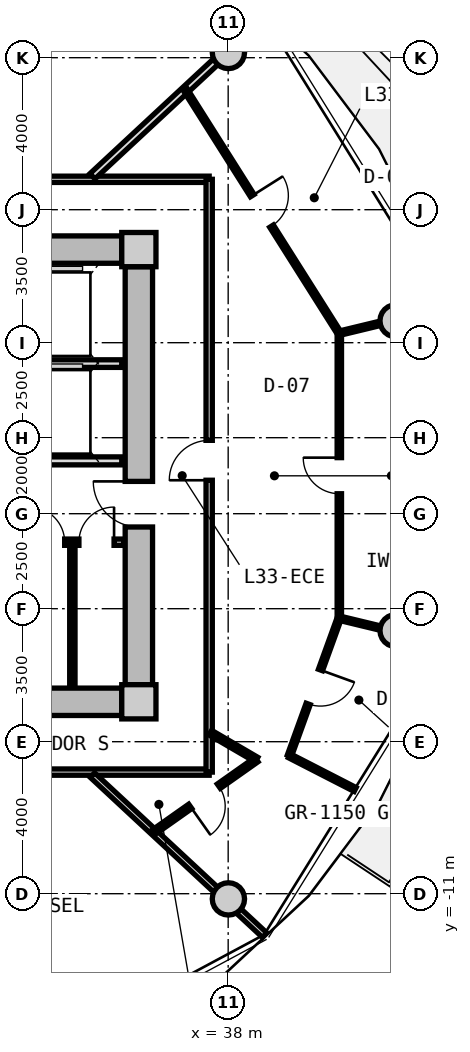
"""IFC4 building model, lengths in metres.
Left out: names, types, materials, properties, quantities, classifications, styles, units other than length and angle.
Written with IfcOpenShell. Run it as: python <this file> out.ifc"""

import sys

from ifc_helpers import new_model, si_unit, direction, frame, frame_2d, origin, origin_2d, place, context, subcontext, project, spatial, rectangle, circle, extrude, source, transform, mapped, element, fill, save


model = new_model("IFC4")
c1 = context("Model", 3, precision=1e-05, world=origin(), true_north=direction((0.0, 1.0)))
c2 = subcontext(c1, "Body", "Model", "MODEL_VIEW")
j1 = project(units=[si_unit("LENGTHUNIT", "METRE"), si_unit("PLANEANGLEUNIT", "RADIAN")], contexts=[c1])
p1 = place(None, origin())
s1 = spatial("IfcSite", under=j1, at=p1, CompositionType="ELEMENT")
p2 = place(p1, origin())
s2 = spatial("IfcBuilding", under=s1, at=p2, CompositionType="ELEMENT")
p3 = place(p2, frame((0.0, 0.0, 108.45)))
s3 = spatial("IfcBuildingStorey", under=s2, at=p3, CompositionType="ELEMENT", Elevation=108.45)
m1 = source(origin(), c2, "Body", "SweptSolid", [
    extrude(rectangle(XDim=0.9, YDim=0.9, at=origin_2d()), origin(), (0.0, 0.0, 1.0), 3.05),
])
for number, where, z_axis, x_axis in (
    (1, (35.65, -5.95, 0.0), (0.0, 0.0, 1.0), (1.0, 0.0, 0.0)),
    (2, (35.65, 5.95, 0.0), (0.0, 0.0, 1.0), (1.0, 0.0, 0.0)),
):
    element("IfcColumn", number, at=place(p3, frame(where, z_axis=z_axis, x_axis=x_axis)), inside=s3, PredefinedType="COLUMN", context=c2, shape_type="MappedRepresentation", body=[
        mapped(m1, transform((0.0, 0.0, 0.0), x_axis=(1.0, 0.0, 0.0), y_axis=(0.0, 1.0, 0.0), z_axis=(0.0, 0.0, 1.0), scale=1.0)),
    ])
m2 = source(origin(), c2, "Body", "SweptSolid", [
    extrude(rectangle(XDim=14.4, YDim=0.72, at=frame_2d((7.2, 0.0))), origin(), (0.0, 0.0, 1.0), 2.79),
])
for number, where, z_axis, x_axis in (
    (3, (20.8, 5.95, 0.0), (0.0, 0.0, 1.0), (1.0, 0.0, 0.0)),
    (4, (35.2, -5.95, 0.0), (0.0, 0.0, 1.0), (-1.0, 0.0, 0.0)),
):
    element("IfcWall", number, at=place(p3, frame(where, z_axis=z_axis, x_axis=x_axis)), inside=s3, PredefinedType="SHEAR", context=c2, shape_type="MappedRepresentation", body=[
        mapped(m2, transform((0.0, 0.0, 0.0), x_axis=(1.0, 0.0, 0.0), y_axis=(0.0, 1.0, 0.0), z_axis=(0.0, 0.0, 1.0), scale=1.0)),
    ])
m3 = source(origin(), c2, "Body", "SweptSolid", [
    extrude(rectangle(XDim=11.0, YDim=0.72, at=frame_2d((5.5, 0.0))), origin(), (0.0, 0.0, 1.0), 2.79),
])
p4 = place(p3, frame((35.65, 5.5, 0.0), z_axis=(0.0, 0.0, 1.0), x_axis=(0.0, -1.0, 0.0)))
e5 = element("IfcWall", 5, at=p4, inside=s3, PredefinedType="SHEAR", context=c2, shape_type="MappedRepresentation", body=[
    mapped(m3, transform((0.0, 0.0, 0.0), x_axis=(1.0, 0.0, 0.0), y_axis=(0.0, 1.0, 0.0), z_axis=(0.0, 0.0, 1.0), scale=1.0)),
])
p5 = place(p4, frame((5.65, 0.0, 0.0)))
e6 = element("IfcOpeningElement", 6, at=p5, cuts=e5, PredefinedType="OPENING", context=c2, shape_type="SweptSolid", body=[
    extrude(rectangle(XDim=1.2, YDim=2.15, at=frame_2d((0.6, 1.075))), frame((0.0, 0.37, 0.0), z_axis=(0.0, -1.0, 0.0), x_axis=(1.0, 0.0, 0.0)), (0.0, 0.0, 1.0), 0.74),
])
m4 = source(origin(), c2, "Body", "SweptSolid", [
    extrude(circle(Radius=0.425, at=origin_2d()), origin(), (0.0, 0.0, 1.0), 3.05),
])
for number, where, z_axis, x_axis in (
    (7, (42.419, 4.076, 0.0), (0.0, 0.0, 1.0), (1.0, 0.0, 0.0)),
    (8, (38.006, 11.137, 0.0), (0.0, 0.0, 1.0), (1.0, 0.0, 0.0)),
    (9, (38.006, -11.137, 0.0), (0.0, 0.0, 1.0), (1.0, 0.0, 0.0)),
    (10, (42.419, -4.076, 0.0), (0.0, 0.0, 1.0), (1.0, 0.0, 0.0)),
):
    element("IfcColumn", number, at=place(p3, frame(where, z_axis=z_axis, x_axis=x_axis)), inside=s3, PredefinedType="COLUMN", context=c2, shape_type="MappedRepresentation", body=[
        mapped(m4, transform((0.0, 0.0, 0.0), x_axis=(1.0, 0.0, 0.0), y_axis=(0.0, 1.0, 0.0), z_axis=(0.0, 0.0, 1.0), scale=1.0)),
    ])
m5 = source(origin(), c2, "Body", "SweptSolid", [
    extrude(rectangle(XDim=3.2, YDim=0.2, at=frame_2d((1.6, 0.0))), origin(), (0.0, 0.0, 1.0), 2.775),
])
p6 = place(p3, frame((32.0, 2.95, 0.0), z_axis=(0.0, 0.0, 1.0), x_axis=(1.0, 0.0, 0.0)))
e11 = element("IfcWall", 11, at=p6, inside=s3, PredefinedType="PARTITIONING", context=c2, shape_type="MappedRepresentation", body=[
    mapped(m5, transform((0.0, 0.0, 0.0), x_axis=(1.0, 0.0, 0.0), y_axis=(0.0, 1.0, 0.0), z_axis=(0.0, 0.0, 1.0), scale=1.0)),
])
m6 = source(origin(), c2, "Body", "SweptSolid", [
    extrude(rectangle(XDim=6.66, YDim=0.21, at=frame_2d((3.33, 0.0))), origin(), (0.0, 0.0, 1.0), 2.775),
])
p7 = place(p3, frame((28.54, 0.39, 0.0), z_axis=(0.0, 0.0, 1.0), x_axis=(1.0, 0.0, 0.0)))
e12 = element("IfcWall", 12, at=p7, inside=s3, PredefinedType="PARTITIONING", context=c2, shape_type="MappedRepresentation", body=[
    mapped(m6, transform((0.0, 0.0, 0.0), x_axis=(1.0, 0.0, 0.0), y_axis=(0.0, 1.0, 0.0), z_axis=(0.0, 0.0, 1.0), scale=1.0)),
])
p8 = place(p7, frame((1.0, 0.0, 0.0)))
e13 = element("IfcOpeningElement", 13, at=p8, cuts=e12, PredefinedType="OPENING", context=c2, shape_type="SweptSolid", body=[
    extrude(rectangle(XDim=1.2, YDim=2.15, at=frame_2d((0.6, 1.075))), frame((0.0, 0.115, 0.0), z_axis=(0.0, -1.0, 0.0), x_axis=(1.0, 0.0, 0.0)), (0.0, 0.0, 1.0), 0.23),
])
m7 = source(origin(), c2, "Body", "SweptSolid", [
    extrude(rectangle(XDim=2.7, YDim=0.165, at=frame_2d((1.35, 0.0))), origin(), (0.0, 0.0, 1.0), 2.775),
])
p9 = place(p3, frame((32.55, -1.75, 0.0), z_axis=(0.0, 0.0, 1.0), x_axis=(1.0, 0.0, 0.0)))
e14 = element("IfcWall", 14, at=p9, inside=s3, PredefinedType="PARTITIONING", context=c2, shape_type="MappedRepresentation", body=[
    mapped(m7, transform((0.0, 0.0, 0.0), x_axis=(1.0, 0.0, 0.0), y_axis=(0.0, 1.0, 0.0), z_axis=(0.0, 0.0, 1.0), scale=1.0)),
])
p10 = place(p9, frame((0.222, 0.0, 0.0)))
e15 = element("IfcOpeningElement", 15, at=p10, cuts=e14, PredefinedType="OPENING", context=c2, shape_type="SweptSolid", body=[
    extrude(rectangle(XDim=0.925, YDim=2.1, at=frame_2d((0.462, 1.05))), frame((0.0, 0.093, 0.0), z_axis=(0.0, -1.0, 0.0), x_axis=(1.0, 0.0, 0.0)), (0.0, 0.0, 1.0), 0.185),
])
p11 = place(p9, frame((1.522, 0.0, 0.0)))
e16 = element("IfcOpeningElement", 16, at=p11, cuts=e14, PredefinedType="OPENING", context=c2, shape_type="SweptSolid", body=[
    extrude(rectangle(XDim=0.925, YDim=2.1, at=frame_2d((0.462, 1.05))), frame((0.0, 0.093, 0.0), z_axis=(0.0, -1.0, 0.0), x_axis=(1.0, 0.0, 0.0)), (0.0, 0.0, 1.0), 0.185),
])
m8 = source(origin(), c2, "Body", "SweptSolid", [
    extrude(rectangle(XDim=3.8, YDim=0.14, at=frame_2d((1.9, 0.0))), origin(), (0.0, 0.0, 1.0), 2.775),
])
p12 = place(p3, frame((33.9, -5.55, 0.0), z_axis=(0.0, 0.0, 1.0), x_axis=(0.0, 1.0, 0.0)))
e17 = element("IfcWall", 17, at=p12, inside=s3, PredefinedType="PARTITIONING", context=c2, shape_type="MappedRepresentation", body=[
    mapped(m8, transform((0.0, 0.0, 0.0), x_axis=(1.0, 0.0, 0.0), y_axis=(0.0, 1.0, 0.0), z_axis=(0.0, 0.0, 1.0), scale=1.0)),
])
m9 = source(origin(), c2, "Body", "SweptSolid", [
    extrude(rectangle(XDim=9.234, YDim=0.165, at=frame_2d((4.617, 0.0))), origin(), (0.0, 0.0, 1.0), 2.775),
])
p13 = place(p3, frame((28.266, 7.8, 0.0), z_axis=(0.0, 0.0, 1.0), x_axis=(1.0, 0.0, 0.0)))
e18 = element("IfcWall", 18, at=p13, inside=s3, PredefinedType="PARTITIONING", context=c2, shape_type="MappedRepresentation", body=[
    mapped(m9, transform((0.0, 0.0, 0.0), x_axis=(1.0, 0.0, 0.0), y_axis=(0.0, 1.0, 0.0), z_axis=(0.0, 0.0, 1.0), scale=1.0)),
])
p14 = place(p13, frame((2.588, 0.0, 0.0)))
e19 = element("IfcOpeningElement", 19, at=p14, cuts=e18, PredefinedType="OPENING", context=c2, shape_type="SweptSolid", body=[
    extrude(rectangle(XDim=1.25, YDim=2.2, at=frame_2d((0.625, 1.1))), frame((0.0, 0.093, 0.0), z_axis=(0.0, -1.0, 0.0), x_axis=(1.0, 0.0, 0.0)), (0.0, 0.0, 1.0), 0.185),
])
m10 = source(origin(), c2, "Body", "SweptSolid", [
    extrude(rectangle(XDim=8.6, YDim=0.165, at=frame_2d((4.3, 0.0))), origin(), (0.0, 0.0, 1.0), 2.775),
])
p15 = place(p3, frame((37.5, -7.8, 0.0), z_axis=(0.0, 0.0, 1.0), x_axis=(-1.0, 0.0, 0.0)))
e20 = element("IfcWall", 20, at=p15, inside=s3, PredefinedType="PARTITIONING", context=c2, shape_type="MappedRepresentation", body=[
    mapped(m10, transform((0.0, 0.0, 0.0), x_axis=(1.0, 0.0, 0.0), y_axis=(0.0, 1.0, 0.0), z_axis=(0.0, 0.0, 1.0), scale=1.0)),
])
m11 = source(origin(), c2, "Body", "SweptSolid", [
    extrude(rectangle(XDim=15.6, YDim=0.165, at=frame_2d((7.8, 0.0))), origin(), (0.0, 0.0, 1.0), 2.775),
])
p16 = place(p3, frame((37.5, 7.8, 0.0), z_axis=(0.0, 0.0, 1.0), x_axis=(0.0, -1.0, 0.0)))
e21 = element("IfcWall", 21, at=p16, inside=s3, PredefinedType="PARTITIONING", context=c2, shape_type="MappedRepresentation", body=[
    mapped(m11, transform((0.0, 0.0, 0.0), x_axis=(1.0, 0.0, 0.0), y_axis=(0.0, 1.0, 0.0), z_axis=(0.0, 0.0, 1.0), scale=1.0)),
])
p17 = place(p16, frame((6.87, 0.0, 0.0)))
e22 = element("IfcOpeningElement", 22, at=p17, cuts=e21, PredefinedType="OPENING", context=c2, shape_type="SweptSolid", body=[
    extrude(rectangle(XDim=1.05, YDim=2.15, at=frame_2d((0.525, 1.075))), frame((0.0, 0.093, 0.0), z_axis=(0.0, -1.0, 0.0), x_axis=(1.0, 0.0, 0.0)), (0.0, 0.0, 1.0), 0.185),
])
m12 = source(origin(), c2, "Body", "SweptSolid", [
    extrude(rectangle(XDim=6.187, YDim=0.165, at=frame_2d((3.093, 0.0))), origin(), (0.0, 0.0, 1.0), 2.275),
])
p18 = place(p3, frame((34.429, -7.88, 0.0), z_axis=(0.0, 0.0, 1.0), x_axis=(0.732501077882, -0.680765870841, 0.0)))
e23 = element("IfcWall", 23, at=p18, inside=s3, PredefinedType="PARTITIONING", context=c2, shape_type="MappedRepresentation", body=[
    mapped(m12, transform((0.0, 0.0, 0.0), x_axis=(1.0, 0.0, 0.0), y_axis=(0.0, 1.0, 0.0), z_axis=(0.0, 0.0, 1.0), scale=1.0)),
])
m13 = source(origin(), c2, "Body", "SweptSolid", [
    extrude(rectangle(XDim=6.187, YDim=0.19, at=frame_2d((3.093, 0.0))), origin(), (0.0, 0.0, 1.0), 2.275),
])
p19 = place(p3, frame((34.429, 7.88, 0.0), z_axis=(0.0, 0.0, 1.0), x_axis=(0.732501077882, 0.680765870841, 0.0)))
e24 = element("IfcWall", 24, at=p19, inside=s3, PredefinedType="PARTITIONING", context=c2, shape_type="MappedRepresentation", body=[
    mapped(m13, transform((0.0, 0.0, 0.0), x_axis=(1.0, 0.0, 0.0), y_axis=(0.0, 1.0, 0.0), z_axis=(0.0, 0.0, 1.0), scale=1.0)),
])
m14 = source(origin(), c2, "Body", "SweptSolid", [
    extrude(rectangle(XDim=7.499, YDim=0.115, at=frame_2d((3.75, 0.0))), origin(), (0.0, 0.0, 1.0), 2.775),
])
p20 = place(p3, frame((40.925, -3.75, 0.0), z_axis=(0.0, 0.0, 1.0), x_axis=(0.0, 1.0, 0.0)))
e25 = element("IfcWall", 25, at=p20, inside=s3, PredefinedType="PARTITIONING", context=c2, shape_type="MappedRepresentation", body=[
    mapped(m14, transform((0.0, 0.0, 0.0), x_axis=(1.0, 0.0, 0.0), y_axis=(0.0, 1.0, 0.0), z_axis=(0.0, 0.0, 1.0), scale=1.0)),
])
p21 = place(p20, frame((3.275, 0.0, 0.0)))
e26 = element("IfcOpeningElement", 26, at=p21, cuts=e25, PredefinedType="OPENING", context=c2, shape_type="SweptSolid", body=[
    extrude(rectangle(XDim=0.95, YDim=2.1, at=frame_2d((0.475, 1.05))), frame((0.0, 0.067, 0.0), z_axis=(0.0, -1.0, 0.0), x_axis=(1.0, 0.0, 0.0)), (0.0, 0.0, 1.0), 0.135),
])
m15 = source(origin(), c2, "Body", "SweptSolid", [
    extrude(rectangle(XDim=2.879, YDim=0.115, at=frame_2d((1.439, 0.0))), origin(), (0.0, 0.0, 1.0), 2.275),
])
p22 = place(p3, frame((40.925, -3.75, 0.0), z_axis=(0.0, 0.0, 1.0), x_axis=(0.972018140943, -0.234905797454, 0.0)))
e27 = element("IfcWall", 27, at=p22, inside=s3, PredefinedType="PARTITIONING", context=c2, shape_type="MappedRepresentation", body=[
    mapped(m15, transform((0.0, 0.0, 0.0), x_axis=(1.0, 0.0, 0.0), y_axis=(0.0, 1.0, 0.0), z_axis=(0.0, 0.0, 1.0), scale=1.0)),
])
m16 = source(origin(), c2, "Body", "SweptSolid", [
    extrude(rectangle(XDim=7.618, YDim=0.115, at=frame_2d((3.809, 0.0))), origin(), (0.0, 0.0, 1.0), 2.775),
])
p23 = place(p3, frame((40.923, 3.749, 0.0), z_axis=(0.0, 0.0, 1.0), x_axis=(-0.534316104929, 0.845284744931, 0.0)))
e28 = element("IfcWall", 28, at=p23, inside=s3, PredefinedType="PARTITIONING", context=c2, shape_type="MappedRepresentation", body=[
    mapped(m16, transform((0.0, 0.0, 0.0), x_axis=(1.0, 0.0, 0.0), y_axis=(0.0, 1.0, 0.0), z_axis=(0.0, 0.0, 1.0), scale=1.0)),
])
p24 = place(p23, frame((3.334, 0.0, 0.0)))
e29 = element("IfcOpeningElement", 29, at=p24, cuts=e28, PredefinedType="OPENING", context=c2, shape_type="SweptSolid", body=[
    extrude(rectangle(XDim=0.95, YDim=2.1, at=frame_2d((0.475, 1.05))), frame((0.0, 0.067, 0.0), z_axis=(0.0, -1.0, 0.0), x_axis=(1.0, 0.0, 0.0)), (0.0, 0.0, 1.0), 0.135),
])
m17 = source(origin(), c2, "Body", "SweptSolid", [
    extrude(rectangle(XDim=2.881, YDim=0.115, at=frame_2d((1.44, 0.0))), origin(), (0.0, 0.0, 1.0), 2.275),
])
p25 = place(p3, frame((40.923, 3.749, 0.0), z_axis=(0.0, 0.0, 1.0), x_axis=(0.972031524605, 0.234850410208, 0.0)))
e30 = element("IfcWall", 30, at=p25, inside=s3, PredefinedType="PARTITIONING", context=c2, shape_type="MappedRepresentation", body=[
    mapped(m17, transform((0.0, 0.0, 0.0), x_axis=(1.0, 0.0, 0.0), y_axis=(0.0, 1.0, 0.0), z_axis=(0.0, 0.0, 1.0), scale=1.0)),
])
m18 = source(origin(), c2, "Body", "SweptSolid", [
    extrude(rectangle(XDim=1.407, YDim=0.14, at=frame_2d((0.704, 0.0))), origin(), (0.0, 0.0, 1.0), 2.775),
])
p26 = place(p3, frame((37.53, -6.762, 0.0), z_axis=(0.0, 0.0, 1.0), x_axis=(0.863539718977, -0.504280828258, 0.0)))
e31 = element("IfcWall", 31, at=p26, inside=s3, PredefinedType="PARTITIONING", context=c2, shape_type="MappedRepresentation", body=[
    mapped(m18, transform((0.0, 0.0, 0.0), x_axis=(1.0, 0.0, 0.0), y_axis=(0.0, 1.0, 0.0), z_axis=(0.0, 0.0, 1.0), scale=1.0)),
])
m19 = source(origin(), c2, "Body", "SweptSolid", [
    extrude(rectangle(XDim=3.347, YDim=0.14, at=frame_2d((1.673, 0.0))), origin(), (0.0, 0.0, 1.0), 2.775),
])
p27 = place(p3, frame((38.745, -7.472, 0.0), z_axis=(0.0, 0.0, 1.0), x_axis=(-0.81705680263, -0.576557179537, 0.0)))
e32 = element("IfcWall", 32, at=p27, inside=s3, PredefinedType="PARTITIONING", context=c2, shape_type="MappedRepresentation", body=[
    mapped(m19, transform((0.0, 0.0, 0.0), x_axis=(1.0, 0.0, 0.0), y_axis=(0.0, 1.0, 0.0), z_axis=(0.0, 0.0, 1.0), scale=1.0)),
])
p28 = place(p27, frame((1.214, 0.0, 0.0)))
e33 = element("IfcOpeningElement", 33, at=p28, cuts=e32, PredefinedType="OPENING", context=c2, shape_type="SweptSolid", body=[
    extrude(rectangle(XDim=0.92, YDim=2.1, at=frame_2d((0.46, 1.05))), frame((0.0, 0.08, 0.0), z_axis=(0.0, -1.0, 0.0), x_axis=(1.0, 0.0, 0.0)), (0.0, 0.0, 1.0), 0.16),
])
m20 = source(origin(), c2, "Body", "SweptSolid", [
    extrude(rectangle(XDim=1.945, YDim=0.115, at=frame_2d((0.973, 0.0))), origin(), (0.0, 0.0, 1.0), 2.775),
])
p29 = place(p3, frame((39.611, -7.37, 0.0), z_axis=(0.0, 0.0, 1.0), x_axis=(0.889684148329, -0.456576517368, 0.0)))
e34 = element("IfcWall", 34, at=p29, inside=s3, PredefinedType="PARTITIONING", context=c2, shape_type="MappedRepresentation", body=[
    mapped(m20, transform((0.0, 0.0, 0.0), x_axis=(1.0, 0.0, 0.0), y_axis=(0.0, 1.0, 0.0), z_axis=(0.0, 0.0, 1.0), scale=1.0)),
])
m21 = source(origin(), c2, "Body", "SweptSolid", [
    extrude(rectangle(XDim=3.852, YDim=0.115, at=frame_2d((1.926, 0.0))), origin(), (0.0, 0.0, 1.0), 2.775),
])
p30 = place(p3, frame((39.611, -7.37, 0.0), z_axis=(0.0, 0.0, 1.0), x_axis=(0.340653649518, 0.940188859257, 0.0)))
e35 = element("IfcWall", 35, at=p30, inside=s3, PredefinedType="PARTITIONING", context=c2, shape_type="MappedRepresentation", body=[
    mapped(m21, transform((0.0, 0.0, 0.0), x_axis=(1.0, 0.0, 0.0), y_axis=(0.0, 1.0, 0.0), z_axis=(0.0, 0.0, 1.0), scale=1.0)),
])
p31 = place(p30, frame((1.451, 0.0, 0.0)))
e36 = element("IfcOpeningElement", 36, at=p31, cuts=e35, PredefinedType="OPENING", context=c2, shape_type="SweptSolid", body=[
    extrude(rectangle(XDim=0.95, YDim=2.1, at=frame_2d((0.475, 1.05))), frame((0.0, 0.067, 0.0), z_axis=(0.0, -1.0, 0.0), x_axis=(1.0, 0.0, 0.0)), (0.0, 0.0, 1.0), 0.135),
])
m22 = source(origin(), c2, "Body", "SweptSolid", [
    extrude(rectangle(XDim=1.2, YDim=2.15, at=frame_2d((0.6, 1.075))), frame((0.0, 0.025, 0.0), z_axis=(0.0, -1.0, 0.0), x_axis=(1.0, 0.0, 0.0)), (0.0, 0.0, 1.0), 0.05),
])
p32 = place(p5, frame((1.2, 0.0, 0.0), z_axis=(0.0, 0.0, 1.0), x_axis=(-1.0, 0.0, 0.0)))
e37 = element("IfcDoor", 37, at=p32, inside=s3, OperationType="SINGLE_SWING_RIGHT", PredefinedType="DOOR", context=c2, shape_type="MappedRepresentation", body=[
    mapped(m22, transform((0.0, 0.0, 0.0), x_axis=(1.0, 0.0, 0.0), y_axis=(0.0, 1.0, 0.0), z_axis=(0.0, 0.0, 1.0), scale=1.0)),
])
fill(e6, e37)
m23 = source(origin(), c2, "Body", "SweptSolid", [
    extrude(rectangle(XDim=0.925, YDim=2.1, at=frame_2d((0.462, 1.05))), frame((0.0, 0.025, 0.0), z_axis=(0.0, -1.0, 0.0), x_axis=(1.0, 0.0, 0.0)), (0.0, 0.0, 1.0), 0.05),
])
p33 = place(p10, origin())
e38 = element("IfcDoor", 38, at=p33, inside=s3, OperationType="SINGLE_SWING_LEFT", PredefinedType="DOOR", context=c2, shape_type="MappedRepresentation", body=[
    mapped(m23, transform((0.0, 0.0, 0.0), x_axis=(1.0, 0.0, 0.0), y_axis=(0.0, 1.0, 0.0), z_axis=(0.0, 0.0, 1.0), scale=1.0)),
])
fill(e15, e38)
p34 = place(p11, origin())
e39 = element("IfcDoor", 39, at=p34, inside=s3, OperationType="SINGLE_SWING_RIGHT", PredefinedType="DOOR", context=c2, shape_type="MappedRepresentation", body=[
    mapped(m23, transform((0.0, 0.0, 0.0), x_axis=(1.0, 0.0, 0.0), y_axis=(0.0, 1.0, 0.0), z_axis=(0.0, 0.0, 1.0), scale=1.0)),
])
fill(e16, e39)
m24 = source(origin(), c2, "Body", "SweptSolid", [
    extrude(rectangle(XDim=1.05, YDim=2.15, at=frame_2d((0.525, 1.075))), frame((0.0, 0.025, 0.0), z_axis=(0.0, -1.0, 0.0), x_axis=(1.0, 0.0, 0.0)), (0.0, 0.0, 1.0), 0.05),
])
p35 = place(p17, frame((1.05, 0.0, 0.0), z_axis=(0.0, 0.0, 1.0), x_axis=(-1.0, 0.0, 0.0)))
e40 = element("IfcDoor", 40, at=p35, inside=s3, OperationType="SINGLE_SWING_LEFT", PredefinedType="DOOR", context=c2, shape_type="MappedRepresentation", body=[
    mapped(m24, transform((0.0, 0.0, 0.0), x_axis=(1.0, 0.0, 0.0), y_axis=(0.0, 1.0, 0.0), z_axis=(0.0, 0.0, 1.0), scale=1.0)),
])
fill(e22, e40)
m25 = source(origin(), c2, "Body", "SweptSolid", [
    extrude(rectangle(XDim=0.92, YDim=2.1, at=frame_2d((0.46, 1.05))), frame((0.0, 0.025, 0.0), z_axis=(0.0, -1.0, 0.0), x_axis=(1.0, 0.0, 0.0)), (0.0, 0.0, 1.0), 0.05),
])
p36 = place(p28, origin())
e41 = element("IfcDoor", 41, at=p36, inside=s3, OperationType="SINGLE_SWING_RIGHT", PredefinedType="DOOR", context=c2, shape_type="MappedRepresentation", body=[
    mapped(m25, transform((0.0, 0.0, 0.0), x_axis=(1.0, 0.0, 0.0), y_axis=(0.0, 1.0, 0.0), z_axis=(0.0, 0.0, 1.0), scale=1.0)),
])
fill(e33, e41)
m26 = source(origin(), c2, "Body", "SweptSolid", [
    extrude(rectangle(XDim=0.95, YDim=2.1, at=frame_2d((0.475, 1.05))), frame((0.0, 0.025, 0.0), z_axis=(0.0, -1.0, 0.0), x_axis=(1.0, 0.0, 0.0)), (0.0, 0.0, 1.0), 0.05),
])
p37 = place(p31, frame((0.95, 0.0, 0.0), z_axis=(0.0, 0.0, 1.0), x_axis=(-1.0, 0.0, 0.0)))
e42 = element("IfcDoor", 42, at=p37, inside=s3, OperationType="SINGLE_SWING_LEFT", PredefinedType="DOOR", context=c2, shape_type="MappedRepresentation", body=[
    mapped(m26, transform((0.0, 0.0, 0.0), x_axis=(1.0, 0.0, 0.0), y_axis=(0.0, 1.0, 0.0), z_axis=(0.0, 0.0, 1.0), scale=1.0)),
])
fill(e36, e42)
p38 = place(p21, origin())
e43 = element("IfcDoor", 43, at=p38, inside=s3, OperationType="SINGLE_SWING_RIGHT", PredefinedType="DOOR", context=c2, shape_type="MappedRepresentation", body=[
    mapped(m26, transform((0.0, 0.0, 0.0), x_axis=(1.0, 0.0, 0.0), y_axis=(0.0, 1.0, 0.0), z_axis=(0.0, 0.0, 1.0), scale=1.0)),
])
fill(e26, e43)
p39 = place(p24, frame((0.95, 0.0, 0.0), z_axis=(0.0, 0.0, 1.0), x_axis=(-1.0, 0.0, 0.0)))
e44 = element("IfcDoor", 44, at=p39, inside=s3, OperationType="SINGLE_SWING_LEFT", PredefinedType="DOOR", context=c2, shape_type="MappedRepresentation", body=[
    mapped(m26, transform((0.0, 0.0, 0.0), x_axis=(1.0, 0.0, 0.0), y_axis=(0.0, 1.0, 0.0), z_axis=(0.0, 0.0, 1.0), scale=1.0)),
])
fill(e29, e44)
save(model, sys.argv[1])
